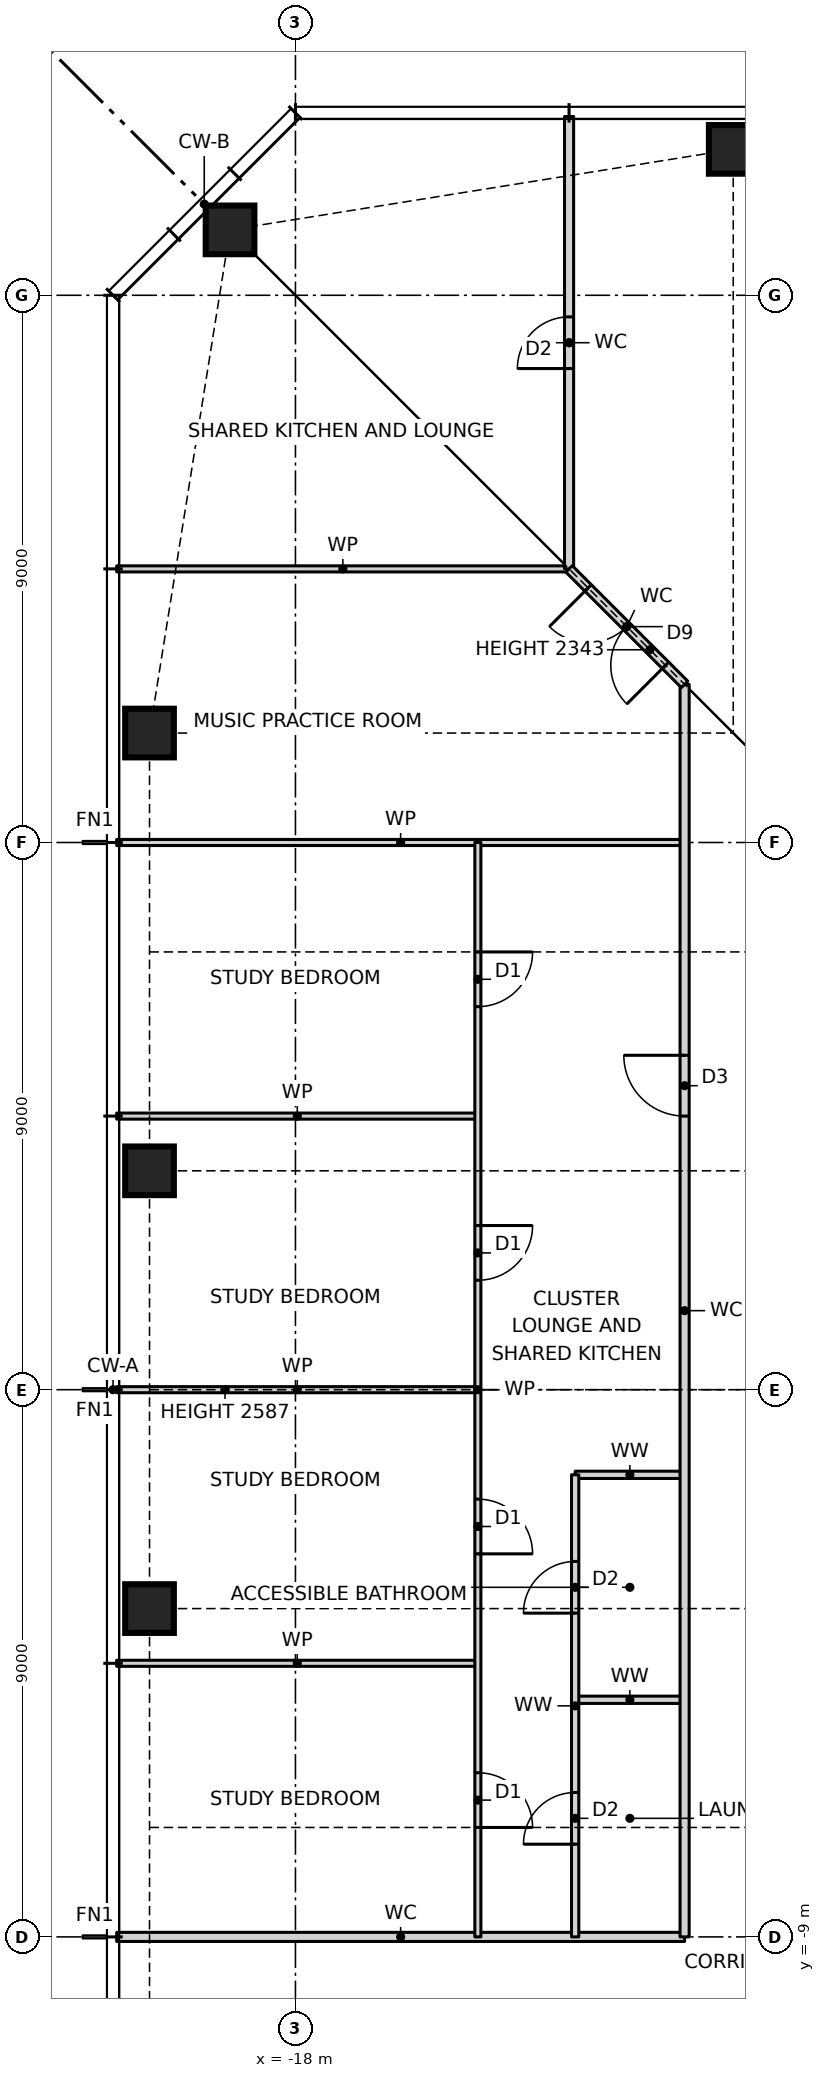
"""IFC4 building model, lengths in metres.
Left out: names, types, materials, properties, quantities, classifications, styles, units other than length and angle.
Written with IfcOpenShell. Run it as: python <this file> out.ifc"""

import sys

from ifc_helpers import new_model, si_unit, direction, frame, frame_2d, origin, origin_2d, place, context, subcontext, project, spatial, rectangle, hollow_rectangle, extrude, element, fill, save


model = new_model("IFC4")
c1 = context("Model", 3, precision=1e-05, world=origin(), true_north=direction((0.0, 1.0)))
c2 = subcontext(c1, "Body", "Model", "MODEL_VIEW")
j1 = project(units=[si_unit("LENGTHUNIT", "METRE"), si_unit("PLANEANGLEUNIT", "RADIAN")], contexts=[c1])
p1 = place(None, origin())
s1 = spatial("IfcSite", under=j1, at=p1, CompositionType="ELEMENT")
p2 = place(p1, origin())
s2 = spatial("IfcBuilding", under=s1, at=p2, CompositionType="ELEMENT")
p3 = place(p2, frame((0.0, 0.0, 108.5)))
s3 = spatial("IfcBuildingStorey", under=s2, at=p3, CompositionType="ELEMENT", Elevation=108.5)
for number, where, z_axis, x_axis in (
    (1, (-10.8, 20.4, 0.0), (0.0, 0.0, 1.0), (1.0, 0.0, 0.0)),
    (2, (-19.076, 19.076, 0.0), (0.0, 0.0, 1.0), (1.0, 0.0, 0.0)),
    (3, (-20.4, 10.8, 0.0), (0.0, 0.0, 1.0), (1.0, 0.0, 0.0)),
    (4, (-20.4, 3.6, 0.0), (0.0, 0.0, 1.0), (1.0, 0.0, 0.0)),
    (5, (-20.4, -3.6, 0.0), (0.0, 0.0, 1.0), (1.0, 0.0, 0.0)),
):
    element("IfcColumn", number, at=place(p3, frame(where, z_axis=z_axis, x_axis=x_axis)), inside=s3, PredefinedType="COLUMN", context=c2, shape_type="SweptSolid", body=[
        extrude(hollow_rectangle(XDim=0.8, YDim=0.8, WallThickness=0.07, at=origin_2d()), origin(), (0.0, 0.0, 1.0), 3.5),
    ])
p4 = place(p3, frame((-20.94, -9.0, 0.0), z_axis=(0.0, 0.0, 1.0), x_axis=(1.0, 0.0, 0.0)))
e6 = element("IfcWall", 6, at=p4, inside=s3, PredefinedType="PARTITIONING", context=c2, shape_type="SweptSolid", body=[
    extrude(rectangle(XDim=9.34, YDim=0.15, at=frame_2d((4.67, 0.0))), origin(), (0.0, 0.0, 1.0), 3.27),
])
p5 = place(p3, frame((-13.4, -5.1, 0.0), z_axis=(0.0, 0.0, 1.0), x_axis=(1.0, 0.0, 0.0)))
e7 = element("IfcWall", 7, at=p5, inside=s3, PredefinedType="PARTITIONING", context=c2, shape_type="SweptSolid", body=[
    extrude(rectangle(XDim=1.8, YDim=0.12, at=frame_2d((0.9, 0.0))), origin(), (0.0, 0.0, 1.0), 3.27),
])
p6 = place(p3, frame((-20.94, -4.5, 0.0), z_axis=(0.0, 0.0, 1.0), x_axis=(1.0, 0.0, 0.0)))
e8 = element("IfcWall", 8, at=p6, inside=s3, PredefinedType="PARTITIONING", context=c2, shape_type="SweptSolid", body=[
    extrude(rectangle(XDim=5.94, YDim=0.1, at=frame_2d((2.97, 0.0))), origin(), (0.0, 0.0, 1.0), 3.27),
])
p7 = place(p3, frame((-13.4, -1.4, 0.0), z_axis=(0.0, 0.0, 1.0), x_axis=(1.0, 0.0, 0.0)))
e9 = element("IfcWall", 9, at=p7, inside=s3, PredefinedType="PARTITIONING", context=c2, shape_type="SweptSolid", body=[
    extrude(rectangle(XDim=1.8, YDim=0.12, at=frame_2d((0.9, 0.0))), origin(), (0.0, 0.0, 1.0), 3.27),
])
p8 = place(p3, frame((-20.94, 0.0, 0.0), z_axis=(0.0, 0.0, 1.0), x_axis=(1.0, 0.0, 0.0)))
e10 = element("IfcWall", 10, at=p8, inside=s3, PredefinedType="PARTITIONING", context=c2, shape_type="SweptSolid", body=[
    extrude(rectangle(XDim=5.94, YDim=0.1, at=frame_2d((2.97, 0.0))), origin(), (0.0, 0.0, 1.0), 2.587),
])
p9 = place(p3, frame((-20.94, 4.5, 0.0), z_axis=(0.0, 0.0, 1.0), x_axis=(1.0, 0.0, 0.0)))
e11 = element("IfcWall", 11, at=p9, inside=s3, PredefinedType="PARTITIONING", context=c2, shape_type="SweptSolid", body=[
    extrude(rectangle(XDim=5.94, YDim=0.1, at=frame_2d((2.97, 0.0))), origin(), (0.0, 0.0, 1.0), 3.27),
])
p10 = place(p3, frame((-20.94, 9.0, 0.0), z_axis=(0.0, 0.0, 1.0), x_axis=(1.0, 0.0, 0.0)))
e12 = element("IfcWall", 12, at=p10, inside=s3, PredefinedType="PARTITIONING", context=c2, shape_type="SweptSolid", body=[
    extrude(rectangle(XDim=9.34, YDim=0.1, at=frame_2d((4.67, 0.0))), origin(), (0.0, 0.0, 1.0), 3.27),
])
p11 = place(p3, frame((-20.94, 13.5, 0.0), z_axis=(0.0, 0.0, 1.0), x_axis=(1.0, 0.0, 0.0)))
e13 = element("IfcWall", 13, at=p11, inside=s3, PredefinedType="PARTITIONING", context=c2, shape_type="SweptSolid", body=[
    extrude(rectangle(XDim=7.44, YDim=0.1, at=frame_2d((3.72, 0.0))), origin(), (0.0, 0.0, 1.0), 3.27),
])
p12 = place(p3, frame((-11.6, -9.0, 0.0), z_axis=(0.0, 0.0, 1.0), x_axis=(0.0, 1.0, 0.0)))
e14 = element("IfcWall", 14, at=p12, inside=s3, PredefinedType="PARTITIONING", context=c2, shape_type="SweptSolid", body=[
    extrude(rectangle(XDim=20.6, YDim=0.15, at=frame_2d((10.3, 0.0))), origin(), (0.0, 0.0, 1.0), 3.27),
])
p13 = place(p12, frame((13.5, 0.0, 0.0)))
e15 = element("IfcOpeningElement", 15, at=p13, cuts=e14, PredefinedType="OPENING", context=c2, shape_type="SweptSolid", body=[
    extrude(rectangle(XDim=1.0, YDim=2.1, at=frame_2d((0.5, 1.05))), frame((0.0, 0.085, 0.0), z_axis=(0.0, -1.0, 0.0), x_axis=(1.0, 0.0, 0.0)), (0.0, 0.0, 1.0), 0.17),
])
p14 = place(p3, frame((-13.4, -9.0, 0.0), z_axis=(0.0, 0.0, 1.0), x_axis=(0.0, 1.0, 0.0)))
e16 = element("IfcWall", 16, at=p14, inside=s3, PredefinedType="PARTITIONING", context=c2, shape_type="SweptSolid", body=[
    extrude(rectangle(XDim=7.6, YDim=0.12, at=frame_2d((3.8, 0.0))), origin(), (0.0, 0.0, 1.0), 3.27),
])
p15 = place(p14, frame((5.325, 0.0, 0.0)))
e17 = element("IfcOpeningElement", 17, at=p15, cuts=e16, PredefinedType="OPENING", context=c2, shape_type="SweptSolid", body=[
    extrude(rectangle(XDim=0.85, YDim=2.1, at=frame_2d((0.425, 1.05))), frame((0.0, 0.07, 0.0), z_axis=(0.0, -1.0, 0.0), x_axis=(1.0, 0.0, 0.0)), (0.0, 0.0, 1.0), 0.14),
])
p16 = place(p14, frame((1.525, 0.0, 0.0)))
e18 = element("IfcOpeningElement", 18, at=p16, cuts=e16, PredefinedType="OPENING", context=c2, shape_type="SweptSolid", body=[
    extrude(rectangle(XDim=0.85, YDim=2.1, at=frame_2d((0.425, 1.05))), frame((0.0, 0.07, 0.0), z_axis=(0.0, -1.0, 0.0), x_axis=(1.0, 0.0, 0.0)), (0.0, 0.0, 1.0), 0.14),
])
p17 = place(p3, frame((-13.5, 13.5, 0.0), z_axis=(0.0, 0.0, 1.0), x_axis=(0.0, 1.0, 0.0)))
e19 = element("IfcWall", 19, at=p17, inside=s3, PredefinedType="PARTITIONING", context=c2, shape_type="SweptSolid", body=[
    extrude(rectangle(XDim=7.44, YDim=0.15, at=frame_2d((3.72, 0.0))), origin(), (0.0, 0.0, 1.0), 3.27),
])
p18 = place(p17, frame((3.295, 0.0, 0.0)))
e20 = element("IfcOpeningElement", 20, at=p18, cuts=e19, PredefinedType="OPENING", context=c2, shape_type="SweptSolid", body=[
    extrude(rectangle(XDim=0.85, YDim=2.1, at=frame_2d((0.425, 1.05))), frame((0.0, 0.085, 0.0), z_axis=(0.0, -1.0, 0.0), x_axis=(1.0, 0.0, 0.0)), (0.0, 0.0, 1.0), 0.17),
])
p19 = place(p3, frame((-15.0, -9.0, 0.0), z_axis=(0.0, 0.0, 1.0), x_axis=(0.0, 1.0, 0.0)))
e21 = element("IfcWall", 21, at=p19, inside=s3, PredefinedType="PARTITIONING", context=c2, shape_type="SweptSolid", body=[
    extrude(rectangle(XDim=18.0, YDim=0.1, at=frame_2d((9.0, 0.0))), origin(), (0.0, 0.0, 1.0), 3.27),
])
p20 = place(p19, frame((15.3, 0.0, 0.0)))
e22 = element("IfcOpeningElement", 22, at=p20, cuts=e21, PredefinedType="OPENING", context=c2, shape_type="SweptSolid", body=[
    extrude(rectangle(XDim=0.9, YDim=2.1, at=frame_2d((0.45, 1.05))), frame((0.0, 0.06, 0.0), z_axis=(0.0, -1.0, 0.0), x_axis=(1.0, 0.0, 0.0)), (0.0, 0.0, 1.0), 0.12),
])
p21 = place(p19, frame((10.8, 0.0, 0.0)))
e23 = element("IfcOpeningElement", 23, at=p21, cuts=e21, PredefinedType="OPENING", context=c2, shape_type="SweptSolid", body=[
    extrude(rectangle(XDim=0.9, YDim=2.1, at=frame_2d((0.45, 1.05))), frame((0.0, 0.06, 0.0), z_axis=(0.0, -1.0, 0.0), x_axis=(1.0, 0.0, 0.0)), (0.0, 0.0, 1.0), 0.12),
])
p22 = place(p19, frame((6.3, 0.0, 0.0)))
e24 = element("IfcOpeningElement", 24, at=p22, cuts=e21, PredefinedType="OPENING", context=c2, shape_type="SweptSolid", body=[
    extrude(rectangle(XDim=0.9, YDim=2.1, at=frame_2d((0.45, 1.05))), frame((0.0, 0.06, 0.0), z_axis=(0.0, -1.0, 0.0), x_axis=(1.0, 0.0, 0.0)), (0.0, 0.0, 1.0), 0.12),
])
p23 = place(p19, frame((1.8, 0.0, 0.0)))
e25 = element("IfcOpeningElement", 25, at=p23, cuts=e21, PredefinedType="OPENING", context=c2, shape_type="SweptSolid", body=[
    extrude(rectangle(XDim=0.9, YDim=2.1, at=frame_2d((0.45, 1.05))), frame((0.0, 0.06, 0.0), z_axis=(0.0, -1.0, 0.0), x_axis=(1.0, 0.0, 0.0)), (0.0, 0.0, 1.0), 0.12),
])
p24 = place(p3, frame((-11.6, 11.6, 0.0), z_axis=(0.0, 0.0, 1.0), x_axis=(-0.707106781187, 0.707106781187, 0.0)))
e26 = element("IfcWall", 26, at=p24, inside=s3, PredefinedType="PARTITIONING", context=c2, shape_type="SweptSolid", body=[
    extrude(rectangle(XDim=2.687, YDim=0.15, at=frame_2d((1.343, 0.0))), origin(), (0.0, 0.0, 1.0), 2.343),
])
p25 = place(p24, frame((0.444, 0.0, 0.0)))
e27 = element("IfcOpeningElement", 27, at=p25, cuts=e26, PredefinedType="OPENING", context=c2, shape_type="SweptSolid", body=[
    extrude(rectangle(XDim=1.8, YDim=2.1, at=frame_2d((0.9, 1.05))), frame((0.0, 0.085, 0.0), z_axis=(0.0, -1.0, 0.0), x_axis=(1.0, 0.0, 0.0)), (0.0, 0.0, 1.0), 0.17),
])
p26 = place(p25, origin())
e28 = element("IfcDoor", 28, at=p26, inside=s3, OperationType="DOUBLE_DOOR_SINGLE_SWING", PredefinedType="DOOR", context=c2, shape_type="SweptSolid", body=[
    extrude(rectangle(XDim=1.8, YDim=2.1, at=frame_2d((0.9, 1.05))), frame((0.0, 0.025, 0.0), z_axis=(0.0, -1.0, 0.0), x_axis=(1.0, 0.0, 0.0)), (0.0, 0.0, 1.0), 0.05),
])
fill(e27, e28)
p27 = place(p20, frame((0.9, 0.0, 0.0), z_axis=(0.0, 0.0, 1.0), x_axis=(-1.0, 0.0, 0.0)))
e29 = element("IfcDoor", 29, at=p27, inside=s3, OperationType="SINGLE_SWING_LEFT", PredefinedType="DOOR", context=c2, shape_type="SweptSolid", body=[
    extrude(rectangle(XDim=0.9, YDim=2.1, at=frame_2d((0.45, 1.05))), frame((0.0, 0.025, 0.0), z_axis=(0.0, -1.0, 0.0), x_axis=(1.0, 0.0, 0.0)), (0.0, 0.0, 1.0), 0.05),
])
fill(e22, e29)
p28 = place(p21, frame((0.9, 0.0, 0.0), z_axis=(0.0, 0.0, 1.0), x_axis=(-1.0, 0.0, 0.0)))
e30 = element("IfcDoor", 30, at=p28, inside=s3, OperationType="SINGLE_SWING_LEFT", PredefinedType="DOOR", context=c2, shape_type="SweptSolid", body=[
    extrude(rectangle(XDim=0.9, YDim=2.1, at=frame_2d((0.45, 1.05))), frame((0.0, 0.025, 0.0), z_axis=(0.0, -1.0, 0.0), x_axis=(1.0, 0.0, 0.0)), (0.0, 0.0, 1.0), 0.05),
])
fill(e23, e30)
p29 = place(p22, frame((0.9, 0.0, 0.0), z_axis=(0.0, 0.0, 1.0), x_axis=(-1.0, 0.0, 0.0)))
e31 = element("IfcDoor", 31, at=p29, inside=s3, OperationType="SINGLE_SWING_RIGHT", PredefinedType="DOOR", context=c2, shape_type="SweptSolid", body=[
    extrude(rectangle(XDim=0.9, YDim=2.1, at=frame_2d((0.45, 1.05))), frame((0.0, 0.025, 0.0), z_axis=(0.0, -1.0, 0.0), x_axis=(1.0, 0.0, 0.0)), (0.0, 0.0, 1.0), 0.05),
])
fill(e24, e31)
p30 = place(p23, frame((0.9, 0.0, 0.0), z_axis=(0.0, 0.0, 1.0), x_axis=(-1.0, 0.0, 0.0)))
e32 = element("IfcDoor", 32, at=p30, inside=s3, OperationType="SINGLE_SWING_RIGHT", PredefinedType="DOOR", context=c2, shape_type="SweptSolid", body=[
    extrude(rectangle(XDim=0.9, YDim=2.1, at=frame_2d((0.45, 1.05))), frame((0.0, 0.025, 0.0), z_axis=(0.0, -1.0, 0.0), x_axis=(1.0, 0.0, 0.0)), (0.0, 0.0, 1.0), 0.05),
])
fill(e25, e32)
p31 = place(p13, origin())
e33 = element("IfcDoor", 33, at=p31, inside=s3, OperationType="SINGLE_SWING_RIGHT", PredefinedType="DOOR", context=c2, shape_type="SweptSolid", body=[
    extrude(rectangle(XDim=1.0, YDim=2.1, at=frame_2d((0.5, 1.05))), frame((0.0, 0.025, 0.0), z_axis=(0.0, -1.0, 0.0), x_axis=(1.0, 0.0, 0.0)), (0.0, 0.0, 1.0), 0.05),
])
fill(e15, e33)
p32 = place(p15, origin())
e34 = element("IfcDoor", 34, at=p32, inside=s3, OperationType="SINGLE_SWING_LEFT", PredefinedType="DOOR", context=c2, shape_type="SweptSolid", body=[
    extrude(rectangle(XDim=0.85, YDim=2.1, at=frame_2d((0.425, 1.05))), frame((0.0, 0.025, 0.0), z_axis=(0.0, -1.0, 0.0), x_axis=(1.0, 0.0, 0.0)), (0.0, 0.0, 1.0), 0.05),
])
fill(e17, e34)
p33 = place(p16, origin())
e35 = element("IfcDoor", 35, at=p33, inside=s3, OperationType="SINGLE_SWING_LEFT", PredefinedType="DOOR", context=c2, shape_type="SweptSolid", body=[
    extrude(rectangle(XDim=0.85, YDim=2.1, at=frame_2d((0.425, 1.05))), frame((0.0, 0.025, 0.0), z_axis=(0.0, -1.0, 0.0), x_axis=(1.0, 0.0, 0.0)), (0.0, 0.0, 1.0), 0.05),
])
fill(e18, e35)
p34 = place(p18, origin())
e36 = element("IfcDoor", 36, at=p34, inside=s3, OperationType="SINGLE_SWING_LEFT", PredefinedType="DOOR", context=c2, shape_type="SweptSolid", body=[
    extrude(rectangle(XDim=0.85, YDim=2.1, at=frame_2d((0.425, 1.05))), frame((0.0, 0.025, 0.0), z_axis=(0.0, -1.0, 0.0), x_axis=(1.0, 0.0, 0.0)), (0.0, 0.0, 1.0), 0.05),
])
fill(e20, e36)
save(model, sys.argv[1])
